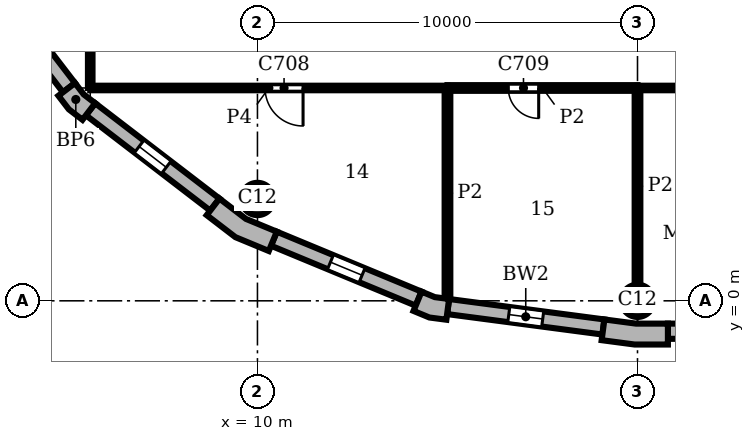
"""IFC4 building model, lengths in metres.
Left out: names, types, materials, properties, quantities, classifications, styles, units other than length and angle.
Written with IfcOpenShell. Run it as: python <this file> out.ifc"""

import sys

from ifc_helpers import new_model, si_unit, direction, frame, frame_2d, origin, origin_2d, place, context, subcontext, project, spatial, polyline, rectangle, circle, outline, extrude, element, fill, save


model = new_model("IFC4")
c1 = context("Model", 3, precision=1e-05, world=origin(), true_north=direction((0.0, 1.0)))
c2 = subcontext(c1, "Body", "Model", "MODEL_VIEW")
j1 = project(units=[si_unit("LENGTHUNIT", "METRE"), si_unit("PLANEANGLEUNIT", "RADIAN")], contexts=[c1])
p1 = place(None, origin())
s1 = spatial("IfcSite", under=j1, at=p1, CompositionType="ELEMENT")
p2 = place(p1, origin())
s2 = spatial("IfcBuilding", under=s1, at=p2, CompositionType="ELEMENT")
p3 = place(p2, frame((0.0, 0.0, 309.9)))
s3 = spatial("IfcBuildingStorey", under=s2, at=p3, CompositionType="ELEMENT", Elevation=309.9)
for number, where, z_axis, x_axis in (
    (1, (20.0, 0.0, 0.0), (0.0, 0.0, 1.0), (1.0, 0.0, 0.0)),
    (2, (10.0, 2.679, 0.0), (0.0, 0.0, 1.0), (1.0, 0.0, 0.0)),
):
    element("IfcColumn", number, at=place(p3, frame(where, z_axis=z_axis, x_axis=x_axis)), inside=s3, PredefinedType="COLUMN", context=c2, shape_type="SweptSolid", body=[
        extrude(circle(Radius=0.425, at=origin_2d()), origin(), (0.0, 0.0, 1.0), 3.9),
    ])
p4 = place(p3, origin())
e3 = element("IfcWall", 3, at=p4, inside=s3, PredefinedType="SOLIDWALL", context=c2, shape_type="SweptSolid", body=[
    extrude(outline(polyline([(19.076, -0.887), (19.057, -1.036), (19.925, -1.15), (20.8, -1.15), (20.8, -1.0), (20.8, -0.6), (19.961, -0.6), (19.128, -0.49), (19.076, -0.887)])), origin(), (0.0, 0.0, 1.0), 3.9),
])
e4 = element("IfcWall", 4, at=p4, inside=s3, PredefinedType="SOLIDWALL", context=c2, shape_type="SweptSolid", body=[
    extrude(outline(polyline([(4.882, 5.487), (4.763, 5.396), (5.038, 5.038), (5.396, 4.763), (5.487, 4.882), (5.731, 5.199), (5.43, 5.43), (5.199, 5.731), (4.882, 5.487)])), origin(), (0.0, 0.0, 1.0), 3.9),
])
e5 = element("IfcWall", 5, at=p4, inside=s3, PredefinedType="SOLIDWALL", context=c2, shape_type="SweptSolid", body=[
    extrude(outline(polyline([(8.757, 2.373), (8.665, 2.254), (9.42, 1.675), (10.299, 1.311), (10.356, 1.449), (10.51, 1.819), (9.698, 2.155), (9.0, 2.69), (8.757, 2.373)])), origin(), (0.0, 0.0, 1.0), 3.9),
])
e6 = element("IfcWall", 6, at=p4, inside=s3, PredefinedType="SOLIDWALL", context=c2, shape_type="SweptSolid", body=[
    extrude(outline(polyline([(14.164, -0.128), (14.106, -0.266), (14.523, -0.439), (14.971, -0.498), (14.99, -0.349), (15.043, 0.047), (14.667, 0.097), (14.317, 0.242), (14.164, -0.128)])), origin(), (0.0, 0.0, 1.0), 3.9),
])
p5 = place(p3, frame((20.8, -0.8, 0.0), z_axis=(0.0, 0.0, 1.0), x_axis=(1.0, 0.0, 0.0)))
e7 = element("IfcWall", 7, at=p5, inside=s3, PredefinedType="SOLIDWALL", context=c2, shape_type="SweptSolid", body=[
    extrude(rectangle(XDim=18.4, YDim=0.4, at=frame_2d((9.2, 0.0))), origin(), (0.0, 0.0, 1.0), 3.9),
])
p6 = place(p5, frame((3.75, 0.0, 0.9)))
e8 = element("IfcOpeningElement", 8, at=p6, cuts=e7, PredefinedType="OPENING", context=c2, shape_type="SweptSolid", body=[
    extrude(rectangle(XDim=0.9, YDim=2.35, at=frame_2d((0.45, 1.175))), frame((0.0, 0.21, 0.0), z_axis=(0.0, -1.0, 0.0), x_axis=(1.0, 0.0, 0.0)), (0.0, 0.0, 1.0), 0.42),
])
p7 = place(p5, frame((13.75, 0.0, 0.9)))
e9 = element("IfcOpeningElement", 9, at=p7, cuts=e7, PredefinedType="OPENING", context=c2, shape_type="SweptSolid", body=[
    extrude(rectangle(XDim=0.9, YDim=2.35, at=frame_2d((0.45, 1.175))), frame((0.0, 0.21, 0.0), z_axis=(0.0, -1.0, 0.0), x_axis=(1.0, 0.0, 0.0)), (0.0, 0.0, 1.0), 0.42),
])
p8 = place(p3, frame((2.532, 8.878, 0.0), z_axis=(0.0, 0.0, 1.0), x_axis=(0.608759824817, -0.793354571229, 0.0)))
e10 = element("IfcWall", 10, at=p8, inside=s3, PredefinedType="SOLIDWALL", context=c2, shape_type="SweptSolid", body=[
    extrude(rectangle(XDim=4.121, YDim=0.4, at=frame_2d((2.061, 0.0))), origin(), (0.0, 0.0, 1.0), 3.9),
])
p9 = place(p8, frame((1.611, 0.0, 0.9)))
e11 = element("IfcOpeningElement", 11, at=p9, cuts=e10, PredefinedType="OPENING", context=c2, shape_type="SweptSolid", body=[
    extrude(rectangle(XDim=0.9, YDim=2.35, at=frame_2d((0.45, 1.175))), frame((0.0, 0.21, 0.0), z_axis=(0.0, -1.0, 0.0), x_axis=(1.0, 0.0, 0.0)), (0.0, 0.0, 1.0), 0.42),
])
p10 = place(p3, frame((5.609, 5.041, 0.0), z_axis=(0.0, 0.0, 1.0), x_axis=(0.793354571229, -0.608759824817, 0.0)))
e12 = element("IfcWall", 12, at=p10, inside=s3, PredefinedType="SOLIDWALL", context=c2, shape_type="SweptSolid", body=[
    extrude(rectangle(XDim=4.121, YDim=0.4, at=frame_2d((2.061, 0.0))), origin(), (0.0, 0.0, 1.0), 3.9),
])
p11 = place(p10, frame((1.611, 0.0, 0.9)))
e13 = element("IfcOpeningElement", 13, at=p11, cuts=e12, PredefinedType="OPENING", context=c2, shape_type="SweptSolid", body=[
    extrude(rectangle(XDim=0.9, YDim=2.35, at=frame_2d((0.45, 1.175))), frame((0.0, 0.21, 0.0), z_axis=(0.0, -1.0, 0.0), x_axis=(1.0, 0.0, 0.0)), (0.0, 0.0, 1.0), 0.42),
])
p12 = place(p3, frame((10.433, 1.634, 0.0), z_axis=(0.0, 0.0, 1.0), x_axis=(0.923863744394, -0.382721546029, 0.0)))
e14 = element("IfcWall", 14, at=p12, inside=s3, PredefinedType="SOLIDWALL", context=c2, shape_type="SweptSolid", body=[
    extrude(rectangle(XDim=4.121, YDim=0.4, at=frame_2d((2.061, 0.0))), origin(), (0.0, 0.0, 1.0), 3.9),
])
p13 = place(p12, frame((1.611, 0.0, 0.9)))
e15 = element("IfcOpeningElement", 15, at=p13, cuts=e14, PredefinedType="OPENING", context=c2, shape_type="SweptSolid", body=[
    extrude(rectangle(XDim=0.9, YDim=2.35, at=frame_2d((0.45, 1.175))), frame((0.0, 0.21, 0.0), z_axis=(0.0, -1.0, 0.0), x_axis=(1.0, 0.0, 0.0)), (0.0, 0.0, 1.0), 0.42),
])
p14 = place(p3, frame((15.017, -0.151, 0.0), z_axis=(0.0, 0.0, 1.0), x_axis=(0.991446429508, -0.130514280502, 0.0)))
e16 = element("IfcWall", 16, at=p14, inside=s3, PredefinedType="SOLIDWALL", context=c2, shape_type="SweptSolid", body=[
    extrude(rectangle(XDim=4.121, YDim=0.4, at=frame_2d((2.061, 0.0))), origin(), (0.0, 0.0, 1.0), 3.9),
])
p15 = place(p14, frame((1.611, 0.0, 0.9)))
e17 = element("IfcOpeningElement", 17, at=p15, cuts=e16, PredefinedType="OPENING", context=c2, shape_type="SweptSolid", body=[
    extrude(rectangle(XDim=0.9, YDim=2.35, at=frame_2d((0.45, 1.175))), frame((0.0, 0.21, 0.0), z_axis=(0.0, -1.0, 0.0), x_axis=(1.0, 0.0, 0.0)), (0.0, 0.0, 1.0), 0.42),
])
p16 = place(p3, frame((15.0, 0.063, 0.0), z_axis=(0.0, 0.0, 1.0), x_axis=(0.0, 1.0, 0.0)))
e18 = element("IfcWall", 18, at=p16, inside=s3, PredefinedType="PARTITIONING", context=c2, shape_type="SweptSolid", body=[
    extrude(rectangle(XDim=5.537, YDim=0.15, at=frame_2d((2.769, 0.0))), origin(), (0.0, 0.0, 1.0), 3.58),
])
p17 = place(p3, frame((20.0, 0.425, 0.0), z_axis=(0.0, 0.0, 1.0), x_axis=(0.0, 1.0, 0.0)))
e19 = element("IfcWall", 19, at=p17, inside=s3, PredefinedType="PARTITIONING", context=c2, shape_type="SweptSolid", body=[
    extrude(rectangle(XDim=5.175, YDim=0.15, at=frame_2d((2.587, 0.0))), origin(), (0.0, 0.0, 1.0), 3.58),
])
p18 = place(p3, frame((15.0, 5.6, 0.0), z_axis=(0.0, 0.0, 1.0), x_axis=(1.0, 0.0, 0.0)))
e20 = element("IfcWall", 20, at=p18, inside=s3, PredefinedType="PARTITIONING", context=c2, shape_type="SweptSolid", body=[
    extrude(rectangle(XDim=5.0, YDim=0.15, at=frame_2d((2.5, 0.0))), origin(), (0.0, 0.0, 1.0), 3.58),
])
p19 = place(p18, frame((1.6, 0.0, 0.0)))
e21 = element("IfcOpeningElement", 21, at=p19, cuts=e20, PredefinedType="OPENING", context=c2, shape_type="SweptSolid", body=[
    extrude(rectangle(XDim=0.8, YDim=2.1, at=frame_2d((0.4, 1.05))), frame((0.0, 0.085, 0.0), z_axis=(0.0, -1.0, 0.0), x_axis=(1.0, 0.0, 0.0)), (0.0, 0.0, 1.0), 0.17),
])
p20 = place(p3, frame((5.6, 5.6, 0.0), z_axis=(0.0, 0.0, 1.0), x_axis=(0.0, 1.0, 0.0)))
e22 = element("IfcWall", 22, at=p20, inside=s3, PredefinedType="PARTITIONING", context=c2, shape_type="SweptSolid", body=[
    extrude(rectangle(XDim=9.4, YDim=0.12, at=frame_2d((4.7, 0.0))), origin(), (0.0, 0.0, 1.0), 3.58),
])
p21 = place(p20, frame((5.35, 0.0, 0.0)))
e23 = element("IfcOpeningElement", 23, at=p21, cuts=e22, PredefinedType="OPENING", context=c2, shape_type="SweptSolid", body=[
    extrude(rectangle(XDim=1.0, YDim=2.1, at=frame_2d((0.5, 1.05))), frame((0.0, 0.07, 0.0), z_axis=(0.0, -1.0, 0.0), x_axis=(1.0, 0.0, 0.0)), (0.0, 0.0, 1.0), 0.14),
])
p22 = place(p3, frame((5.6, 5.6, 0.0), z_axis=(0.0, 0.0, 1.0), x_axis=(1.0, 0.0, 0.0)))
e24 = element("IfcWall", 24, at=p22, inside=s3, PredefinedType="PARTITIONING", context=c2, shape_type="SweptSolid", body=[
    extrude(rectangle(XDim=9.4, YDim=0.12, at=frame_2d((4.7, 0.0))), origin(), (0.0, 0.0, 1.0), 3.58),
])
p23 = place(p22, frame((4.6, 0.0, 0.0)))
e25 = element("IfcOpeningElement", 25, at=p23, cuts=e24, PredefinedType="OPENING", context=c2, shape_type="SweptSolid", body=[
    extrude(rectangle(XDim=1.0, YDim=2.1, at=frame_2d((0.5, 1.05))), frame((0.0, 0.07, 0.0), z_axis=(0.0, -1.0, 0.0), x_axis=(1.0, 0.0, 0.0)), (0.0, 0.0, 1.0), 0.14),
])
p24 = place(p3, frame((20.0, 5.6, 0.0), z_axis=(0.0, 0.0, 1.0), x_axis=(1.0, 0.0, 0.0)))
e26 = element("IfcWall", 26, at=p24, inside=s3, PredefinedType="PARTITIONING", context=c2, shape_type="SweptSolid", body=[
    extrude(rectangle(XDim=11.0, YDim=0.12, at=frame_2d((5.5, 0.0))), origin(), (0.0, 0.0, 1.0), 3.58),
])
p25 = place(p11, origin())
e27 = element("IfcWindow", 27, at=p25, inside=s3, PartitioningType="SINGLE_PANEL", PredefinedType="WINDOW", context=c2, shape_type="SweptSolid", body=[
    extrude(rectangle(XDim=0.9, YDim=2.35, at=frame_2d((0.45, 1.175))), frame((0.0, 0.16, 0.0), z_axis=(0.0, -1.0, 0.0), x_axis=(1.0, 0.0, 0.0)), (0.0, 0.0, 1.0), 0.06),
])
fill(e13, e27)
p26 = place(p13, origin())
e28 = element("IfcWindow", 28, at=p26, inside=s3, PartitioningType="SINGLE_PANEL", PredefinedType="WINDOW", context=c2, shape_type="SweptSolid", body=[
    extrude(rectangle(XDim=0.9, YDim=2.35, at=frame_2d((0.45, 1.175))), frame((0.0, 0.16, 0.0), z_axis=(0.0, -1.0, 0.0), x_axis=(1.0, 0.0, 0.0)), (0.0, 0.0, 1.0), 0.06),
])
fill(e15, e28)
p27 = place(p15, origin())
e29 = element("IfcWindow", 29, at=p27, inside=s3, PartitioningType="SINGLE_PANEL", PredefinedType="WINDOW", context=c2, shape_type="SweptSolid", body=[
    extrude(rectangle(XDim=0.9, YDim=2.35, at=frame_2d((0.45, 1.175))), frame((0.0, 0.16, 0.0), z_axis=(0.0, -1.0, 0.0), x_axis=(1.0, 0.0, 0.0)), (0.0, 0.0, 1.0), 0.06),
])
fill(e17, e29)
p28 = place(p23, frame((1.0, 0.0, 0.0), z_axis=(0.0, 0.0, 1.0), x_axis=(-1.0, 0.0, 0.0)))
e30 = element("IfcDoor", 30, at=p28, inside=s3, OperationType="SINGLE_SWING_LEFT", PredefinedType="DOOR", context=c2, shape_type="SweptSolid", body=[
    extrude(rectangle(XDim=1.0, YDim=2.1, at=frame_2d((0.5, 1.05))), frame((0.0, 0.025, 0.0), z_axis=(0.0, -1.0, 0.0), x_axis=(1.0, 0.0, 0.0)), (0.0, 0.0, 1.0), 0.05),
])
fill(e25, e30)
p29 = place(p19, frame((0.8, 0.0, 0.0), z_axis=(0.0, 0.0, 1.0), x_axis=(-1.0, 0.0, 0.0)))
e31 = element("IfcDoor", 31, at=p29, inside=s3, OperationType="SINGLE_SWING_LEFT", PredefinedType="DOOR", context=c2, shape_type="SweptSolid", body=[
    extrude(rectangle(XDim=0.8, YDim=2.1, at=frame_2d((0.4, 1.05))), frame((0.0, 0.025, 0.0), z_axis=(0.0, -1.0, 0.0), x_axis=(1.0, 0.0, 0.0)), (0.0, 0.0, 1.0), 0.05),
])
fill(e21, e31)
save(model, sys.argv[1])
